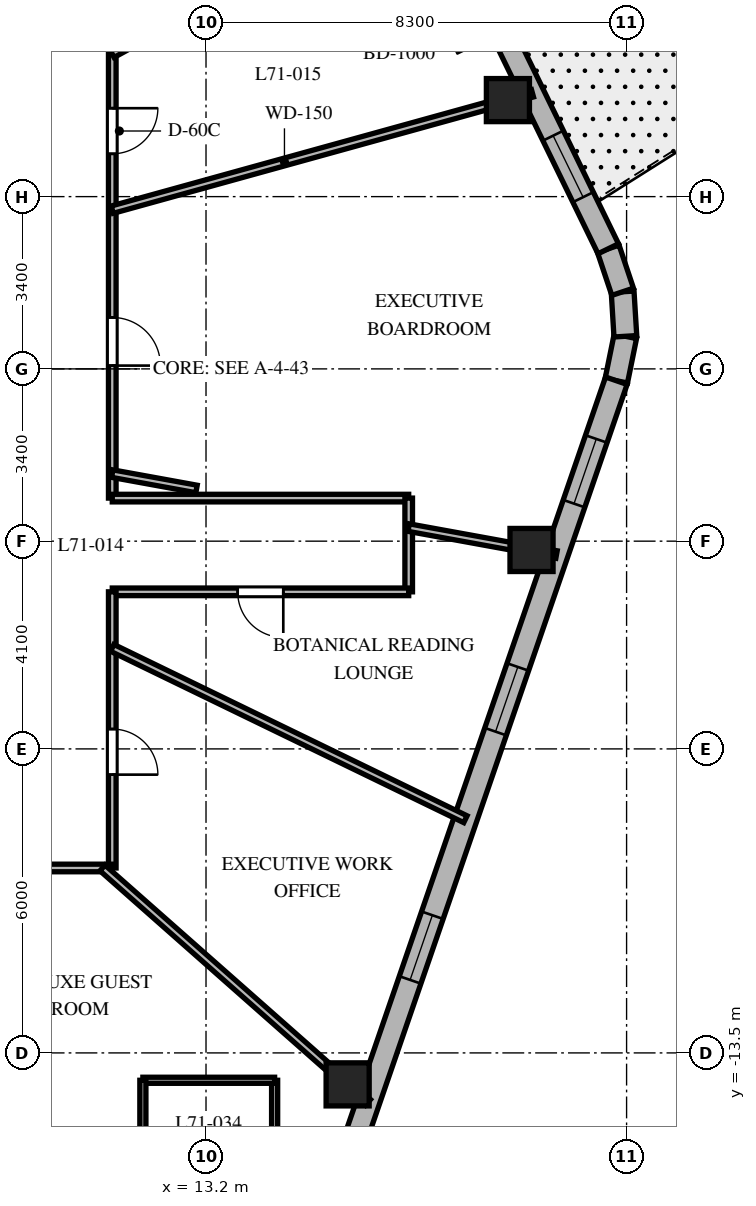
"""IFC4 building model, lengths in metres.
Left out: names, types, materials, properties, quantities, classifications, styles, units other than length and angle.
Written with IfcOpenShell. Run it as: python <this file> out.ifc"""

import sys

from ifc_helpers import new_model, si_unit, direction, frame, frame_2d, origin, origin_2d, place, context, subcontext, project, spatial, rectangle, extrude, element, fill, save


model = new_model("IFC4")
c1 = context("Model", 3, precision=1e-05, world=origin(), true_north=direction((0.0, 1.0)))
c2 = subcontext(c1, "Body", "Model", "MODEL_VIEW")
j1 = project(units=[si_unit("LENGTHUNIT", "METRE"), si_unit("PLANEANGLEUNIT", "RADIAN")], contexts=[c1])
p1 = place(None, origin())
s1 = spatial("IfcSite", under=j1, at=p1, CompositionType="ELEMENT")
p2 = place(p1, origin())
s2 = spatial("IfcBuilding", under=s1, at=p2, CompositionType="ELEMENT")
p3 = place(p2, frame((0.0, 0.0, 284.7)))
s3 = spatial("IfcBuildingStorey", under=s2, at=p3, CompositionType="ELEMENT", Elevation=284.7)
for number, where, z_axis, x_axis in (
    (1, (15.995, -14.121, 0.0), (0.0, 0.0, 1.0), (1.0, 0.0, 0.0)),
    (2, (19.624, -3.574, 0.0), (0.0, 0.0, 1.0), (1.0, 0.0, 0.0)),
    (3, (19.158, 5.305, 0.0), (0.0, 0.0, 1.0), (1.0, 0.0, 0.0)),
):
    element("IfcColumn", number, at=place(p3, frame(where, z_axis=z_axis, x_axis=x_axis)), inside=s3, PredefinedType="COLUMN", context=c2, shape_type="SweptSolid", body=[
        extrude(rectangle(XDim=0.85, YDim=0.85, at=origin_2d()), origin(), (0.0, 0.0, 1.0), 3.9),
    ])
p4 = place(p3, frame((21.298, -0.233, 0.0), z_axis=(0.0, 0.0, 1.0), x_axis=(0.199158176661, 0.979967356941, 0.0)))
e4 = element("IfcWall", 4, at=p4, inside=s3, PredefinedType="SOLIDWALL", context=c2, shape_type="SweptSolid", body=[
    extrude(rectangle(XDim=0.895, YDim=0.45, at=frame_2d((0.447, 0.0))), origin(), (0.0, 0.0, 1.0), 3.58),
])
p5 = place(p3, frame((21.476, 0.644, 0.0), z_axis=(0.0, 0.0, 1.0), x_axis=(-0.061031097918, 0.998135865044, 0.0)))
e5 = element("IfcWall", 5, at=p5, inside=s3, PredefinedType="SOLIDWALL", context=c2, shape_type="SweptSolid", body=[
    extrude(rectangle(XDim=0.88, YDim=0.45, at=frame_2d((0.44, 0.0))), origin(), (0.0, 0.0, 1.0), 3.58),
])
p6 = place(p3, frame((21.422, 1.522, 0.0), z_axis=(0.0, 0.0, 1.0), x_axis=(-0.316964162323, 0.94843751497, 0.0)))
e6 = element("IfcWall", 6, at=p6, inside=s3, PredefinedType="SOLIDWALL", context=c2, shape_type="SweptSolid", body=[
    extrude(rectangle(XDim=0.895, YDim=0.45, at=frame_2d((0.448, 0.0))), origin(), (0.0, 0.0, 1.0), 3.58),
])
p7 = place(p3, frame((15.26, -17.776, 0.0), z_axis=(0.0, 0.0, 1.0), x_axis=(0.325407437101, 0.945573899745, 0.0)))
e7 = element("IfcWall", 7, at=p7, inside=s3, PredefinedType="SOLIDWALL", context=c2, shape_type="SweptSolid", body=[
    extrude(rectangle(XDim=18.552, YDim=0.45, at=frame_2d((9.276, 0.0))), origin(), (0.0, 0.0, 1.0), 3.58),
])
p8 = place(p7, frame((1.161, 0.0, 0.8)))
e8 = element("IfcOpeningElement", 8, at=p8, cuts=e7, PredefinedType="OPENING", context=c2, shape_type="SweptSolid", body=[
    extrude(rectangle(XDim=1.35, YDim=1.75, at=frame_2d((0.675, 0.875))), frame((0.0, 0.235, 0.0), z_axis=(0.0, -1.0, 0.0), x_axis=(1.0, 0.0, 0.0)), (0.0, 0.0, 1.0), 0.47),
])
p9 = place(p7, frame((6.046, 0.0, 0.8)))
e9 = element("IfcOpeningElement", 9, at=p9, cuts=e7, PredefinedType="OPENING", context=c2, shape_type="SweptSolid", body=[
    extrude(rectangle(XDim=1.35, YDim=1.75, at=frame_2d((0.675, 0.875))), frame((0.0, 0.235, 0.0), z_axis=(0.0, -1.0, 0.0), x_axis=(1.0, 0.0, 0.0)), (0.0, 0.0, 1.0), 0.47),
])
p10 = place(p7, frame((11.228, 0.0, 0.8)))
e10 = element("IfcOpeningElement", 10, at=p10, cuts=e7, PredefinedType="OPENING", context=c2, shape_type="SweptSolid", body=[
    extrude(rectangle(XDim=1.35, YDim=1.75, at=frame_2d((0.675, 0.875))), frame((0.0, 0.235, 0.0), z_axis=(0.0, -1.0, 0.0), x_axis=(1.0, 0.0, 0.0)), (0.0, 0.0, 1.0), 0.47),
])
p11 = place(p7, frame((15.987, 0.0, 0.8)))
e11 = element("IfcOpeningElement", 11, at=p11, cuts=e7, PredefinedType="OPENING", context=c2, shape_type="SweptSolid", body=[
    extrude(rectangle(XDim=1.35, YDim=1.75, at=frame_2d((0.675, 0.875))), frame((0.0, 0.235, 0.0), z_axis=(0.0, -1.0, 0.0), x_axis=(1.0, 0.0, 0.0)), (0.0, 0.0, 1.0), 0.47),
])
p12 = place(p3, frame((21.138, 2.371, 0.0), z_axis=(0.0, 0.0, 1.0), x_axis=(-0.438128124058, 0.89891253574, 0.0)))
e12 = element("IfcWall", 12, at=p12, inside=s3, PredefinedType="SOLIDWALL", context=c2, shape_type="SweptSolid", body=[
    extrude(rectangle(XDim=17.565, YDim=0.45, at=frame_2d((8.782, 0.0))), origin(), (0.0, 0.0, 1.0), 3.58),
])
p13 = place(p12, frame((4.769, 0.0, 0.0)))
e13 = element("IfcOpeningElement", 13, at=p13, cuts=e12, PredefinedType="OPENING", context=c2, shape_type="SweptSolid", body=[
    extrude(rectangle(XDim=1.0, YDim=2.15, at=frame_2d((0.5, 1.075))), frame((0.0, 0.235, 0.0), z_axis=(0.0, -1.0, 0.0), x_axis=(1.0, 0.0, 0.0)), (0.0, 0.0, 1.0), 0.47),
])
p14 = place(p12, frame((10.243, 0.0, 0.8)))
e14 = element("IfcOpeningElement", 14, at=p14, cuts=e12, PredefinedType="OPENING", context=c2, shape_type="SweptSolid", body=[
    extrude(rectangle(XDim=1.35, YDim=1.75, at=frame_2d((0.675, 0.875))), frame((0.0, 0.235, 0.0), z_axis=(0.0, -1.0, 0.0), x_axis=(1.0, 0.0, 0.0)), (0.0, 0.0, 1.0), 0.47),
])
p15 = place(p12, frame((15.132, 0.0, 0.8)))
e15 = element("IfcOpeningElement", 15, at=p15, cuts=e12, PredefinedType="OPENING", context=c2, shape_type="SweptSolid", body=[
    extrude(rectangle(XDim=1.35, YDim=1.75, at=frame_2d((0.675, 0.875))), frame((0.0, 0.235, 0.0), z_axis=(0.0, -1.0, 0.0), x_axis=(1.0, 0.0, 0.0)), (0.0, 0.0, 1.0), 0.47),
])
p16 = place(p12, frame((1.133, 0.0, 0.8)))
e16 = element("IfcOpeningElement", 16, at=p16, cuts=e12, PredefinedType="OPENING", context=c2, shape_type="SweptSolid", body=[
    extrude(rectangle(XDim=1.35, YDim=1.75, at=frame_2d((0.675, 0.875))), frame((0.0, 0.235, 0.0), z_axis=(0.0, -1.0, 0.0), x_axis=(1.0, 0.0, 0.0)), (0.0, 0.0, 1.0), 0.47),
])
p17 = place(p3, frame((11.35, 9.85, 0.0), z_axis=(0.0, 0.0, 1.0), x_axis=(0.0, -1.0, 0.0)))
e17 = element("IfcWall", 17, at=p17, inside=s3, PredefinedType="PARTITIONING", context=c2, shape_type="SweptSolid", body=[
    extrude(rectangle(XDim=12.4, YDim=0.15, at=frame_2d((6.2, 0.0))), origin(), (0.0, 0.0, 1.0), 3.07),
])
p18 = place(p17, frame((4.705, 0.0, 0.0)))
e18 = element("IfcOpeningElement", 18, at=p18, cuts=e17, PredefinedType="OPENING", context=c2, shape_type="SweptSolid", body=[
    extrude(rectangle(XDim=0.9, YDim=2.03, at=frame_2d((0.45, 1.015))), frame((0.0, 0.085, 0.0), z_axis=(0.0, -1.0, 0.0), x_axis=(1.0, 0.0, 0.0)), (0.0, 0.0, 1.0), 0.17),
])
p19 = place(p17, frame((1.463, 0.0, 0.0)))
e19 = element("IfcOpeningElement", 19, at=p19, cuts=e17, PredefinedType="OPENING", context=c2, shape_type="SweptSolid", body=[
    extrude(rectangle(XDim=0.95, YDim=2.03, at=frame_2d((0.475, 1.015))), frame((0.0, 0.085, 0.0), z_axis=(0.0, -1.0, 0.0), x_axis=(1.0, 0.0, 0.0)), (0.0, 0.0, 1.0), 0.17),
])
p20 = place(p17, frame((8.835, 0.0, 0.0)))
e20 = element("IfcOpeningElement", 20, at=p20, cuts=e17, PredefinedType="OPENING", context=c2, shape_type="SweptSolid", body=[
    extrude(rectangle(XDim=0.95, YDim=2.03, at=frame_2d((0.475, 1.015))), frame((0.0, 0.085, 0.0), z_axis=(0.0, -1.0, 0.0), x_axis=(1.0, 0.0, 0.0)), (0.0, 0.0, 1.0), 0.17),
])
p21 = place(p3, frame((11.35, -2.55, 0.0), z_axis=(0.0, 0.0, 1.0), x_axis=(1.0, 0.0, 0.0)))
e21 = element("IfcWall", 21, at=p21, inside=s3, PredefinedType="PARTITIONING", context=c2, shape_type="SweptSolid", body=[
    extrude(rectangle(XDim=5.85, YDim=0.15, at=frame_2d((2.925, 0.0))), origin(), (0.0, 0.0, 1.0), 3.021),
])
p22 = place(p3, frame((17.2, -2.55, 0.0), z_axis=(0.0, 0.0, 1.0), x_axis=(0.0, -1.0, 0.0)))
e22 = element("IfcWall", 22, at=p22, inside=s3, PredefinedType="PARTITIONING", context=c2, shape_type="SweptSolid", body=[
    extrude(rectangle(XDim=1.85, YDim=0.15, at=frame_2d((0.925, 0.0))), origin(), (0.0, 0.0, 1.0), 3.07),
])
p23 = place(p3, frame((17.2, -4.4, 0.0), z_axis=(0.0, 0.0, 1.0), x_axis=(-1.0, 0.0, 0.0)))
e23 = element("IfcWall", 23, at=p23, inside=s3, PredefinedType="PARTITIONING", context=c2, shape_type="SweptSolid", body=[
    extrude(rectangle(XDim=5.85, YDim=0.15, at=frame_2d((2.925, 0.0))), origin(), (0.0, 0.0, 1.0), 3.021),
])
p24 = place(p23, frame((2.475, 0.0, 0.0)))
e24 = element("IfcOpeningElement", 24, at=p24, cuts=e23, PredefinedType="OPENING", context=c2, shape_type="SweptSolid", body=[
    extrude(rectangle(XDim=0.9, YDim=2.03, at=frame_2d((0.45, 1.015))), frame((0.0, 0.085, 0.0), z_axis=(0.0, -1.0, 0.0), x_axis=(1.0, 0.0, 0.0)), (0.0, 0.0, 1.0), 0.17),
])
p25 = place(p3, frame((11.35, -4.4, 0.0), z_axis=(0.0, 0.0, 1.0), x_axis=(0.0, -1.0, 0.0)))
e25 = element("IfcWall", 25, at=p25, inside=s3, PredefinedType="PARTITIONING", context=c2, shape_type="SweptSolid", body=[
    extrude(rectangle(XDim=5.45, YDim=0.15, at=frame_2d((2.725, 0.0))), origin(), (0.0, 0.0, 1.0), 3.07),
])
p26 = place(p25, frame((2.708, 0.0, 0.0)))
e26 = element("IfcOpeningElement", 26, at=p26, cuts=e25, PredefinedType="OPENING", context=c2, shape_type="SweptSolid", body=[
    extrude(rectangle(XDim=0.9, YDim=2.03, at=frame_2d((0.45, 1.015))), frame((0.0, 0.085, 0.0), z_axis=(0.0, -1.0, 0.0), x_axis=(1.0, 0.0, 0.0)), (0.0, 0.0, 1.0), 0.17),
])
p27 = place(p3, frame((11.35, -9.85, 0.0), z_axis=(0.0, 0.0, 1.0), x_axis=(-1.0, 0.0, 0.0)))
e27 = element("IfcWall", 27, at=p27, inside=s3, PredefinedType="PARTITIONING", context=c2, shape_type="SweptSolid", body=[
    extrude(rectangle(XDim=10.43, YDim=0.15, at=frame_2d((5.215, 0.0))), origin(), (0.0, 0.0, 1.0), 3.07),
])
p28 = place(p27, frame((8.382, 0.0, 0.0)))
e28 = element("IfcOpeningElement", 28, at=p28, cuts=e27, PredefinedType="OPENING", context=c2, shape_type="SweptSolid", body=[
    extrude(rectangle(XDim=0.95, YDim=2.03, at=frame_2d((0.475, 1.015))), frame((0.0, 0.085, 0.0), z_axis=(0.0, -1.0, 0.0), x_axis=(1.0, 0.0, 0.0)), (0.0, 0.0, 1.0), 0.17),
])
p29 = place(p27, frame((5.75, 0.0, 0.0)))
e29 = element("IfcOpeningElement", 29, at=p29, cuts=e27, PredefinedType="OPENING", context=c2, shape_type="SweptSolid", body=[
    extrude(rectangle(XDim=0.9, YDim=2.03, at=frame_2d((0.45, 1.015))), frame((0.0, 0.085, 0.0), z_axis=(0.0, -1.0, 0.0), x_axis=(1.0, 0.0, 0.0)), (0.0, 0.0, 1.0), 0.17),
])
p30 = place(p27, frame((2.097, 0.0, 0.0)))
e30 = element("IfcOpeningElement", 30, at=p30, cuts=e27, PredefinedType="OPENING", context=c2, shape_type="SweptSolid", body=[
    extrude(rectangle(XDim=0.95, YDim=2.03, at=frame_2d((0.475, 1.015))), frame((0.0, 0.085, 0.0), z_axis=(0.0, -1.0, 0.0), x_axis=(1.0, 0.0, 0.0)), (0.0, 0.0, 1.0), 0.17),
])
p31 = place(p3, frame((11.35, 3.143, 0.0), z_axis=(0.0, 0.0, 1.0), x_axis=(0.963731818141, 0.266872596386, 0.0)))
e31 = element("IfcWall", 31, at=p31, inside=s3, PredefinedType="PARTITIONING", context=c2, shape_type="SweptSolid", body=[
    extrude(rectangle(XDim=8.605, YDim=0.15, at=frame_2d((4.302, 0.0))), origin(), (0.0, 0.0, 1.0), 2.92),
])
p32 = place(p3, frame((11.35, 6.213, 0.0), z_axis=(0.0, 0.0, 1.0), x_axis=(0.877157109774, 0.480203503499, 0.0)))
e32 = element("IfcWall", 32, at=p32, inside=s3, PredefinedType="PARTITIONING", context=c2, shape_type="SweptSolid", body=[
    extrude(rectangle(XDim=7.123, YDim=0.15, at=frame_2d((3.562, 0.0))), origin(), (0.0, 0.0, 1.0), 2.92),
])
p33 = place(p3, frame((6.446, -9.85, 0.0), z_axis=(0.0, 0.0, 1.0), x_axis=(0.547598105704, -0.836741486141, 0.0)))
e33 = element("IfcWall", 33, at=p33, inside=s3, PredefinedType="PARTITIONING", context=c2, shape_type="SweptSolid", body=[
    extrude(rectangle(XDim=11.806, YDim=0.15, at=frame_2d((5.903, 0.0))), origin(), (0.0, 0.0, 1.0), 2.92),
])
p34 = place(p3, frame((11.157, -9.85, 0.0), z_axis=(0.0, 0.0, 1.0), x_axis=(0.74966962095, -0.661812253909, 0.0)))
e34 = element("IfcWall", 34, at=p34, inside=s3, PredefinedType="PARTITIONING", context=c2, shape_type="SweptSolid", body=[
    extrude(rectangle(XDim=6.989, YDim=0.15, at=frame_2d((3.494, 0.0))), origin(), (0.0, 0.0, 1.0), 2.92),
])
p35 = place(p3, frame((11.35, -5.507, 0.0), z_axis=(0.0, 0.0, 1.0), x_axis=(0.899708724615, -0.436490791256, 0.0)))
e35 = element("IfcWall", 35, at=p35, inside=s3, PredefinedType="PARTITIONING", context=c2, shape_type="SweptSolid", body=[
    extrude(rectangle(XDim=7.746, YDim=0.15, at=frame_2d((3.873, 0.0))), origin(), (0.0, 0.0, 1.0), 2.92),
])
p36 = place(p3, frame((11.35, -2.067, 0.0), z_axis=(0.0, 0.0, 1.0), x_axis=(0.983807459651, -0.179228575665, 0.0)))
e36 = element("IfcWall", 36, at=p36, inside=s3, PredefinedType="PARTITIONING", context=c2, shape_type="SweptSolid", body=[
    extrude(rectangle(XDim=1.69, YDim=0.15, at=frame_2d((0.845, 0.0))), origin(), (0.0, 0.0, 1.0), 3.58),
])
p37 = place(p3, frame((17.2, -3.133, 0.0), z_axis=(0.0, 0.0, 1.0), x_axis=(0.983817168797, -0.179175272791, 0.0)))
e37 = element("IfcWall", 37, at=p37, inside=s3, PredefinedType="PARTITIONING", context=c2, shape_type="SweptSolid", body=[
    extrude(rectangle(XDim=2.965, YDim=0.15, at=frame_2d((1.482, 0.0))), origin(), (0.0, 0.0, 1.0), 2.92),
])
p38 = place(p3, frame((14.554, -16.79, 0.0), z_axis=(0.0, 0.0, 1.0), x_axis=(0.0, 1.0, 0.0)))
e38 = element("IfcWall", 38, at=p38, inside=s3, PredefinedType="PARTITIONING", context=c2, shape_type="SweptSolid", body=[
    extrude(rectangle(XDim=2.75, YDim=0.12, at=frame_2d((1.375, 0.0))), origin(), (0.0, 0.0, 1.0), 2.92),
])
p39 = place(p3, frame((14.554, -14.04, 0.0), z_axis=(0.0, 0.0, 1.0), x_axis=(-1.0, 0.0, 0.0)))
e39 = element("IfcWall", 39, at=p39, inside=s3, PredefinedType="PARTITIONING", context=c2, shape_type="SweptSolid", body=[
    extrude(rectangle(XDim=2.6, YDim=0.12, at=frame_2d((1.3, 0.0))), origin(), (0.0, 0.0, 1.0), 3.58),
])
p40 = place(p3, frame((11.954, -14.04, 0.0), z_axis=(0.0, 0.0, 1.0), x_axis=(0.0, -1.0, 0.0)))
e40 = element("IfcWall", 40, at=p40, inside=s3, PredefinedType="PARTITIONING", context=c2, shape_type="SweptSolid", body=[
    extrude(rectangle(XDim=2.75, YDim=0.12, at=frame_2d((1.375, 0.0))), origin(), (0.0, 0.0, 1.0), 2.92),
])
p41 = place(p9, origin())
e41 = element("IfcWindow", 41, at=p41, inside=s3, PartitioningType="SINGLE_PANEL", PredefinedType="WINDOW", context=c2, shape_type="SweptSolid", body=[
    extrude(rectangle(XDim=1.35, YDim=1.75, at=frame_2d((0.675, 0.875))), frame((0.0, 0.03, 0.0), z_axis=(0.0, -1.0, 0.0), x_axis=(1.0, 0.0, 0.0)), (0.0, 0.0, 1.0), 0.06),
])
fill(e9, e41)
p42 = place(p10, origin())
e42 = element("IfcWindow", 42, at=p42, inside=s3, PartitioningType="SINGLE_PANEL", PredefinedType="WINDOW", context=c2, shape_type="SweptSolid", body=[
    extrude(rectangle(XDim=1.35, YDim=1.75, at=frame_2d((0.675, 0.875))), frame((0.0, 0.03, 0.0), z_axis=(0.0, -1.0, 0.0), x_axis=(1.0, 0.0, 0.0)), (0.0, 0.0, 1.0), 0.06),
])
fill(e10, e42)
p43 = place(p11, origin())
e43 = element("IfcWindow", 43, at=p43, inside=s3, PartitioningType="SINGLE_PANEL", PredefinedType="WINDOW", context=c2, shape_type="SweptSolid", body=[
    extrude(rectangle(XDim=1.35, YDim=1.75, at=frame_2d((0.675, 0.875))), frame((0.0, 0.03, 0.0), z_axis=(0.0, -1.0, 0.0), x_axis=(1.0, 0.0, 0.0)), (0.0, 0.0, 1.0), 0.06),
])
fill(e11, e43)
p44 = place(p16, origin())
e44 = element("IfcWindow", 44, at=p44, inside=s3, PartitioningType="SINGLE_PANEL", PredefinedType="WINDOW", context=c2, shape_type="SweptSolid", body=[
    extrude(rectangle(XDim=1.35, YDim=1.75, at=frame_2d((0.675, 0.875))), frame((0.0, 0.03, 0.0), z_axis=(0.0, -1.0, 0.0), x_axis=(1.0, 0.0, 0.0)), (0.0, 0.0, 1.0), 0.06),
])
fill(e16, e44)
p45 = place(p18, origin())
e45 = element("IfcDoor", 45, at=p45, inside=s3, OperationType="SINGLE_SWING_LEFT", PredefinedType="DOOR", context=c2, shape_type="SweptSolid", body=[
    extrude(rectangle(XDim=0.9, YDim=2.03, at=frame_2d((0.45, 1.015))), frame((0.0, 0.025, 0.0), z_axis=(0.0, -1.0, 0.0), x_axis=(1.0, 0.0, 0.0)), (0.0, 0.0, 1.0), 0.05),
])
fill(e18, e45)
p46 = place(p26, origin())
e46 = element("IfcDoor", 46, at=p46, inside=s3, OperationType="SINGLE_SWING_RIGHT", PredefinedType="DOOR", context=c2, shape_type="SweptSolid", body=[
    extrude(rectangle(XDim=0.9, YDim=2.03, at=frame_2d((0.45, 1.015))), frame((0.0, 0.025, 0.0), z_axis=(0.0, -1.0, 0.0), x_axis=(1.0, 0.0, 0.0)), (0.0, 0.0, 1.0), 0.05),
])
fill(e26, e46)
p47 = place(p24, origin())
e47 = element("IfcDoor", 47, at=p47, inside=s3, OperationType="SINGLE_SWING_LEFT", PredefinedType="DOOR", context=c2, shape_type="SweptSolid", body=[
    extrude(rectangle(XDim=0.9, YDim=2.03, at=frame_2d((0.45, 1.015))), frame((0.0, 0.025, 0.0), z_axis=(0.0, -1.0, 0.0), x_axis=(1.0, 0.0, 0.0)), (0.0, 0.0, 1.0), 0.05),
])
fill(e24, e47)
p48 = place(p20, origin())
e48 = element("IfcDoor", 48, at=p48, inside=s3, OperationType="SINGLE_SWING_RIGHT", PredefinedType="DOOR", context=c2, shape_type="SweptSolid", body=[
    extrude(rectangle(XDim=0.95, YDim=2.03, at=frame_2d((0.475, 1.015))), frame((0.0, 0.025, 0.0), z_axis=(0.0, -1.0, 0.0), x_axis=(1.0, 0.0, 0.0)), (0.0, 0.0, 1.0), 0.05),
])
fill(e20, e48)
save(model, sys.argv[1])
